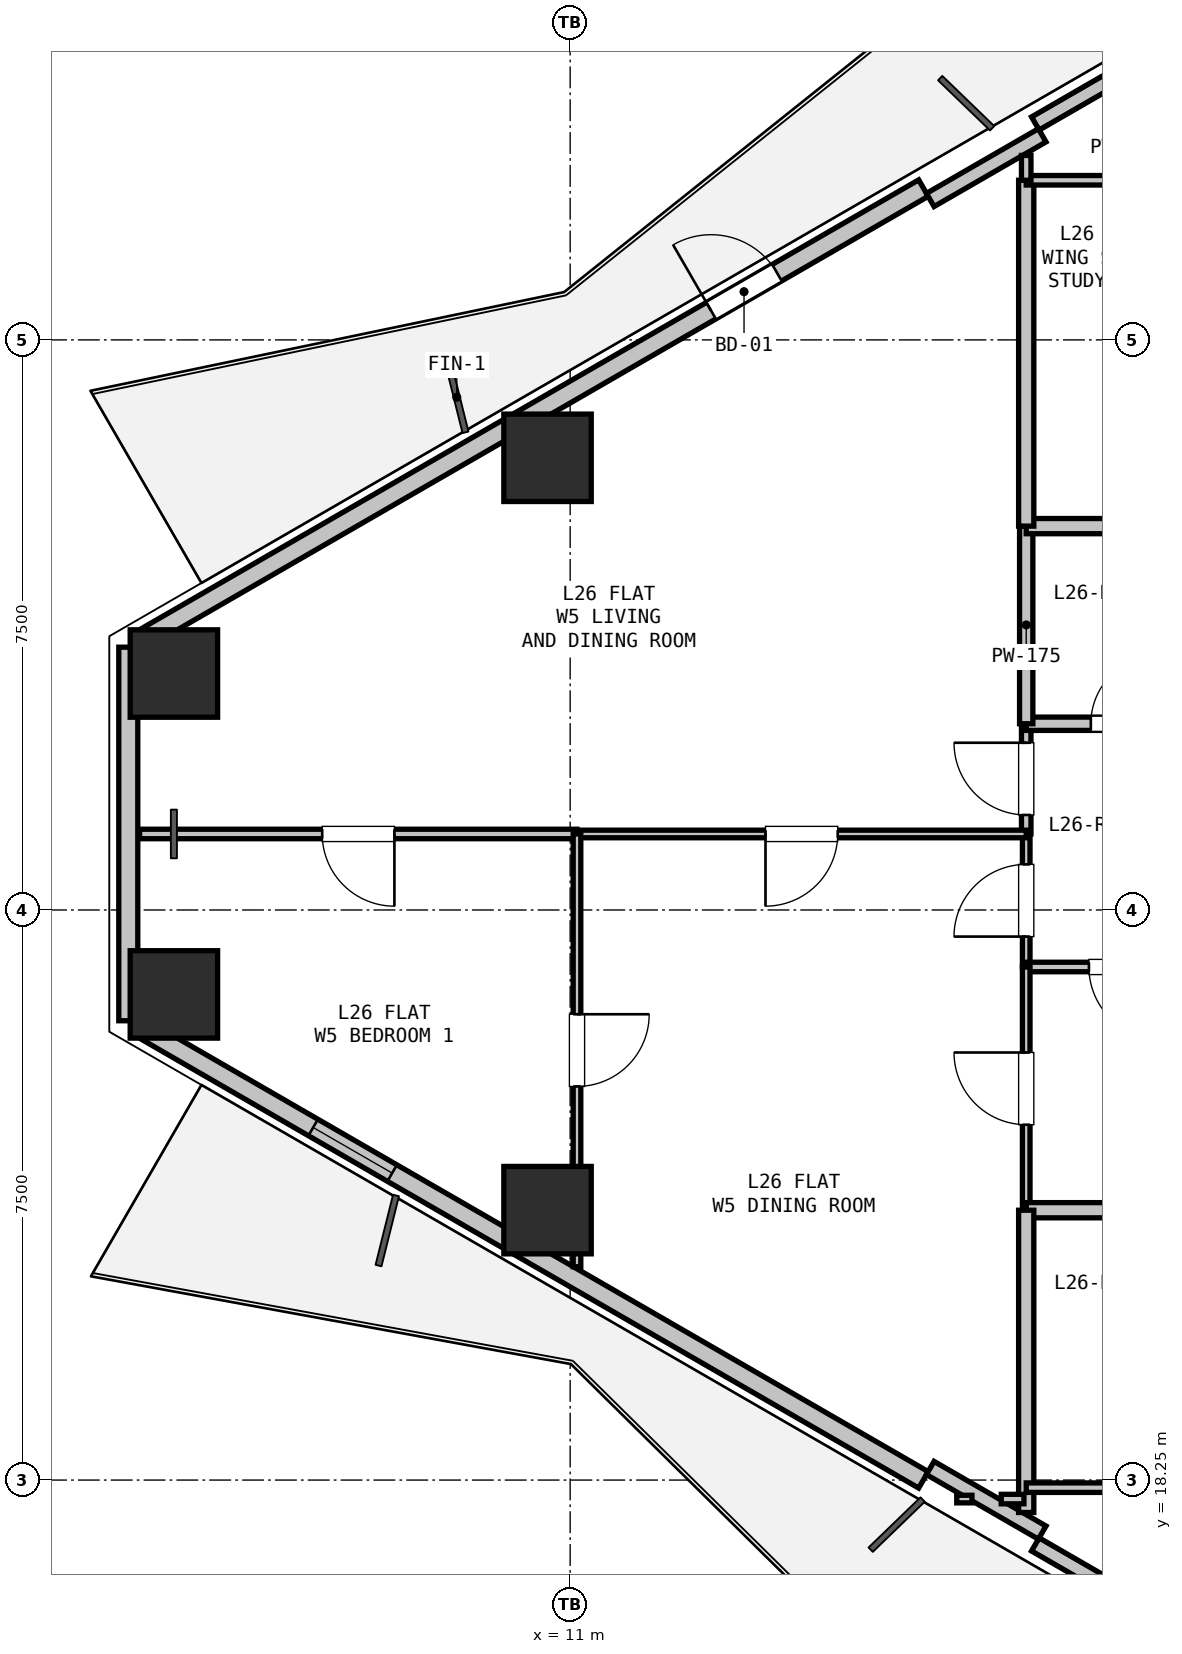
"""IFC4 building model, lengths in metres.
Left out: names, types, materials, properties, quantities, classifications, styles, units other than length and angle.
Written with IfcOpenShell. Run it as: python <this file> out.ifc"""

import sys

from ifc_helpers import new_model, si_unit, direction, frame, frame_2d, origin, origin_2d, place, context, subcontext, project, spatial, rectangle, hollow_rectangle, extrude, element, fill, save


model = new_model("IFC4")
c1 = context("Model", 3, precision=1e-05, world=origin(), true_north=direction((0.0, 1.0)))
c2 = subcontext(c1, "Body", "Model", "MODEL_VIEW")
j1 = project(units=[si_unit("LENGTHUNIT", "METRE"), si_unit("PLANEANGLEUNIT", "RADIAN")], contexts=[c1])
p1 = place(None, origin())
s1 = spatial("IfcSite", under=j1, at=p1, CompositionType="ELEMENT")
p2 = place(p1, origin())
s2 = spatial("IfcBuilding", under=s1, at=p2, CompositionType="ELEMENT")
p3 = place(p2, frame((0.0, 0.0, 96.6)))
s3 = spatial("IfcBuildingStorey", under=s2, at=p3, CompositionType="ELEMENT", Elevation=96.6)
for number, where, z_axis, x_axis in (
    (1, (5.787, 28.861, 0.0), (0.0, 0.0, 1.0), (1.0, 0.0, 0.0)),
    (2, (10.702, 31.699, 0.0), (0.0, 0.0, 1.0), (1.0, 0.0, 0.0)),
    (3, (10.702, 21.801, 0.0), (0.0, 0.0, 1.0), (1.0, 0.0, 0.0)),
    (4, (5.787, 24.639, 0.0), (0.0, 0.0, 1.0), (1.0, 0.0, 0.0)),
):
    element("IfcColumn", number, at=place(p3, frame(where, z_axis=z_axis, x_axis=x_axis)), inside=s3, PredefinedType="COLUMN", context=c2, shape_type="SweptSolid", body=[
        extrude(hollow_rectangle(XDim=1.15, YDim=1.15, WallThickness=0.032, at=origin_2d()), origin(), (0.0, 0.0, 1.0), 3.3),
    ])
p4 = place(p3, frame((5.187, 24.293, 0.0), z_axis=(0.0, 0.0, 1.0), x_axis=(0.0, 1.0, 0.0)))
e5 = element("IfcWall", 5, at=p4, inside=s3, PredefinedType="SOLIDWALL", context=c2, shape_type="SweptSolid", body=[
    extrude(rectangle(XDim=4.915, YDim=0.25, at=frame_2d((2.457, 0.0))), origin(), (0.0, 0.0, 1.0), 2.67),
])
p5 = place(p3, frame((5.317, 29.282, 0.0), z_axis=(0.0, 0.0, 1.0), x_axis=(0.866023023012, 0.500004123596, 0.0)))
e6 = element("IfcWall", 6, at=p5, inside=s3, PredefinedType="SOLIDWALL", context=c2, shape_type="SweptSolid", body=[
    extrude(rectangle(XDim=11.93, YDim=0.25, at=frame_2d((5.965, 0.0))), origin(), (0.0, 0.0, 1.0), 2.67),
])
p6 = place(p5, frame((8.704, 0.0, 0.0)))
e7 = element("IfcOpeningElement", 7, at=p6, cuts=e6, PredefinedType="OPENING", context=c2, shape_type="SweptSolid", body=[
    extrude(rectangle(XDim=1.0, YDim=2.1, at=frame_2d((0.5, 1.05))), frame((0.0, 0.135, 0.0), z_axis=(0.0, -1.0, 0.0), x_axis=(1.0, 0.0, 0.0)), (0.0, 0.0, 1.0), 0.27),
])
p7 = place(p3, frame((17.12, 36.097, 0.0), z_axis=(0.0, 0.0, 1.0), x_axis=(0.866027010039, 0.499997217876, 0.0)))
e8 = element("IfcWall", 8, at=p7, inside=s3, PredefinedType="PARAPET", context=c2, shape_type="SweptSolid", body=[
    extrude(rectangle(XDim=11.229, YDim=0.2, at=frame_2d((5.615, 0.0))), origin(), (0.0, 0.0, 1.0), 0.2),
])
p8 = place(p3, frame((15.738, 35.091, 0.0), z_axis=(0.0, 0.0, 1.0), x_axis=(0.866025371046, 0.500000056704, 0.0)))
e9 = element("IfcWall", 9, at=p8, inside=s3, PredefinedType="PARAPET", context=c2, shape_type="SweptSolid", body=[
    extrude(rectangle(XDim=1.7, YDim=0.2, at=frame_2d((0.85, 0.0))), origin(), (0.0, 0.0, 1.0), 2.67),
])
p9 = place(p3, frame((26.845, 11.788, 0.0), z_axis=(0.0, 0.0, 1.0), x_axis=(-0.866027010039, 0.499997217876, 0.0)))
e10 = element("IfcWall", 10, at=p9, inside=s3, PredefinedType="PARAPET", context=c2, shape_type="SweptSolid", body=[
    extrude(rectangle(XDim=11.229, YDim=0.2, at=frame_2d((5.615, 0.0))), origin(), (0.0, 0.0, 1.0), 0.2),
])
p10 = place(p3, frame((15.648, 18.253, 0.0), z_axis=(0.0, 0.0, 1.0), x_axis=(-0.866023023012, 0.500004123596, 0.0)))
e11 = element("IfcWall", 11, at=p10, inside=s3, PredefinedType="SOLIDWALL", context=c2, shape_type="SweptSolid", body=[
    extrude(rectangle(XDim=11.93, YDim=0.25, at=frame_2d((5.965, 0.0))), origin(), (0.0, 0.0, 1.0), 2.67),
])
p11 = place(p10, frame((8.071, 0.0, 0.9)))
e12 = element("IfcOpeningElement", 12, at=p11, cuts=e11, PredefinedType="OPENING", context=c2, shape_type="SweptSolid", body=[
    extrude(rectangle(XDim=1.2, YDim=1.4, at=frame_2d((0.6, 0.7))), frame((0.0, 0.135, 0.0), z_axis=(0.0, -1.0, 0.0), x_axis=(1.0, 0.0, 0.0)), (0.0, 0.0, 1.0), 0.27),
])
p12 = place(p3, frame((17.21, 17.559, 0.0), z_axis=(0.0, 0.0, 1.0), x_axis=(-0.866025371046, 0.500000056704, 0.0)))
e13 = element("IfcWall", 13, at=p12, inside=s3, PredefinedType="PARAPET", context=c2, shape_type="SweptSolid", body=[
    extrude(rectangle(XDim=1.7, YDim=0.2, at=frame_2d((0.85, 0.0))), origin(), (0.0, 0.0, 1.0), 2.67),
])
p13 = place(p3, frame((17.0, 25.0, 0.0), z_axis=(0.0, 0.0, 1.0), x_axis=(0.0, 1.0, 0.0)))
e14 = element("IfcWall", 14, at=p13, inside=s3, PredefinedType="PARTITIONING", context=c2, shape_type="SweptSolid", body=[
    extrude(rectangle(XDim=1.75, YDim=0.1, at=frame_2d((0.875, 0.0))), origin(), (0.0, 0.0, 1.0), 3.05),
])
p14 = place(p13, frame((0.4, 0.0, 0.0)))
e15 = element("IfcOpeningElement", 15, at=p14, cuts=e14, PredefinedType="OPENING", context=c2, shape_type="SweptSolid", body=[
    extrude(rectangle(XDim=0.95, YDim=2.1, at=frame_2d((0.475, 1.05))), frame((0.0, 0.06, 0.0), z_axis=(0.0, -1.0, 0.0), x_axis=(1.0, 0.0, 0.0)), (0.0, 0.0, 1.0), 0.12),
])
p15 = place(p3, frame((17.0, 26.75, 0.0), z_axis=(0.0, 0.0, 1.0), x_axis=(0.0, 1.0, 0.0)))
e16 = element("IfcWall", 16, at=p15, inside=s3, PredefinedType="PARTITIONING", context=c2, shape_type="SweptSolid", body=[
    extrude(rectangle(XDim=1.45, YDim=0.125, at=frame_2d((0.725, 0.0))), origin(), (0.0, 0.0, 1.0), 3.05),
])
p16 = place(p15, frame((0.25, 0.0, 0.0)))
e17 = element("IfcOpeningElement", 17, at=p16, cuts=e16, PredefinedType="OPENING", context=c2, shape_type="SweptSolid", body=[
    extrude(rectangle(XDim=0.95, YDim=2.1, at=frame_2d((0.475, 1.05))), frame((0.0, 0.073, 0.0), z_axis=(0.0, -1.0, 0.0), x_axis=(1.0, 0.0, 0.0)), (0.0, 0.0, 1.0), 0.145),
])
p17 = place(p3, frame((17.0, 28.2, 0.0), z_axis=(0.0, 0.0, 1.0), x_axis=(1.0, 0.0, 0.0)))
e18 = element("IfcWall", 18, at=p17, inside=s3, PredefinedType="PLUMBINGWALL", context=c2, shape_type="SweptSolid", body=[
    extrude(rectangle(XDim=2.6, YDim=0.175, at=frame_2d((1.3, 0.0))), origin(), (0.0, 0.0, 1.0), 3.05),
])
p18 = place(p17, frame((0.85, 0.0, 0.0)))
e19 = element("IfcOpeningElement", 19, at=p18, cuts=e18, PredefinedType="OPENING", context=c2, shape_type="SweptSolid", body=[
    extrude(rectangle(XDim=0.9, YDim=2.1, at=frame_2d((0.45, 1.05))), frame((0.0, 0.097, 0.0), z_axis=(0.0, -1.0, 0.0), x_axis=(1.0, 0.0, 0.0)), (0.0, 0.0, 1.0), 0.195),
])
p19 = place(p3, frame((19.6, 25.0, 0.0), z_axis=(0.0, 0.0, 1.0), x_axis=(-1.0, 0.0, 0.0)))
e20 = element("IfcWall", 20, at=p19, inside=s3, PredefinedType="PARTITIONING", context=c2, shape_type="SweptSolid", body=[
    extrude(rectangle(XDim=2.6, YDim=0.125, at=frame_2d((1.3, 0.0))), origin(), (0.0, 0.0, 1.0), 3.05),
])
p20 = place(p19, frame((0.825, 0.0, 0.0)))
e21 = element("IfcOpeningElement", 21, at=p20, cuts=e20, PredefinedType="OPENING", context=c2, shape_type="SweptSolid", body=[
    extrude(rectangle(XDim=0.95, YDim=2.1, at=frame_2d((0.475, 1.05))), frame((0.0, 0.073, 0.0), z_axis=(0.0, -1.0, 0.0), x_axis=(1.0, 0.0, 0.0)), (0.0, 0.0, 1.0), 0.145),
])
p21 = place(p3, frame((17.0, 28.2, 0.0), z_axis=(0.0, 0.0, 1.0), x_axis=(0.0, 1.0, 0.0)))
e22 = element("IfcWall", 22, at=p21, inside=s3, PredefinedType="PLUMBINGWALL", context=c2, shape_type="SweptSolid", body=[
    extrude(rectangle(XDim=2.6, YDim=0.175, at=frame_2d((1.3, 0.0))), origin(), (0.0, 0.0, 1.0), 3.05),
])
p22 = place(p3, frame((17.0, 30.8, 0.0), z_axis=(0.0, 0.0, 1.0), x_axis=(1.0, 0.0, 0.0)))
e23 = element("IfcWall", 23, at=p22, inside=s3, PredefinedType="PARTITIONING", context=c2, shape_type="SweptSolid", body=[
    extrude(rectangle(XDim=2.6, YDim=0.2, at=frame_2d((1.3, 0.0))), origin(), (0.0, 0.0, 1.0), 3.05),
])
p23 = place(p3, frame((17.0, 21.8, 0.0), z_axis=(0.0, 0.0, 1.0), x_axis=(0.0, 1.0, 0.0)))
e24 = element("IfcWall", 24, at=p23, inside=s3, PredefinedType="PARTITIONING", context=c2, shape_type="SweptSolid", body=[
    extrude(rectangle(XDim=3.2, YDim=0.1, at=frame_2d((1.6, 0.0))), origin(), (0.0, 0.0, 1.0), 2.423),
])
p24 = place(p23, frame((1.125, 0.0, 0.0)))
e25 = element("IfcOpeningElement", 25, at=p24, cuts=e24, PredefinedType="OPENING", context=c2, shape_type="SweptSolid", body=[
    extrude(rectangle(XDim=0.95, YDim=2.1, at=frame_2d((0.475, 1.05))), frame((0.0, 0.06, 0.0), z_axis=(0.0, -1.0, 0.0), x_axis=(1.0, 0.0, 0.0)), (0.0, 0.0, 1.0), 0.12),
])
p25 = place(p3, frame((19.6, 21.8, 0.0), z_axis=(0.0, 0.0, 1.0), x_axis=(-1.0, 0.0, 0.0)))
e26 = element("IfcWall", 26, at=p25, inside=s3, PredefinedType="PARTITIONING", context=c2, shape_type="SweptSolid", body=[
    extrude(rectangle(XDim=2.6, YDim=0.2, at=frame_2d((1.3, 0.0))), origin(), (0.0, 0.0, 1.0), 2.423),
])
p26 = place(p3, frame((17.0, 30.8, 0.0), z_axis=(0.0, 0.0, 1.0), x_axis=(0.0, 1.0, 0.0)))
e27 = element("IfcWall", 27, at=p26, inside=s3, PredefinedType="PARTITIONING", context=c2, shape_type="SweptSolid", body=[
    extrude(rectangle(XDim=4.55, YDim=0.2, at=frame_2d((2.275, 0.0))), origin(), (0.0, 0.0, 1.0), 2.365),
])
p27 = place(p3, frame((17.0, 35.35, 0.0), z_axis=(0.0, 0.0, 1.0), x_axis=(1.0, 0.0, 0.0)))
e28 = element("IfcWall", 28, at=p27, inside=s3, PredefinedType="PARTITIONING", context=c2, shape_type="SweptSolid", body=[
    extrude(rectangle(XDim=2.6, YDim=0.125, at=frame_2d((1.3, 0.0))), origin(), (0.0, 0.0, 1.0), 2.365),
])
p28 = place(p3, frame((17.0, 17.823, 0.0), z_axis=(0.0, 0.0, 1.0), x_axis=(0.0, 1.0, 0.0)))
e29 = element("IfcWall", 29, at=p28, inside=s3, PredefinedType="PARTITIONING", context=c2, shape_type="SweptSolid", body=[
    extrude(rectangle(XDim=3.977, YDim=0.2, at=frame_2d((1.988, 0.0))), origin(), (0.0, 0.0, 1.0), 2.365),
])
p29 = place(p3, frame((19.6, 18.15, 0.0), z_axis=(0.0, 0.0, 1.0), x_axis=(-1.0, 0.0, 0.0)))
e30 = element("IfcWall", 30, at=p29, inside=s3, PredefinedType="PARTITIONING", context=c2, shape_type="SweptSolid", body=[
    extrude(rectangle(XDim=2.6, YDim=0.125, at=frame_2d((1.3, 0.0))), origin(), (0.0, 0.0, 1.0), 2.365),
])
p30 = place(p3, frame((17.0, 35.677, 0.0), z_axis=(0.0, 0.0, 1.0), x_axis=(0.0, -1.0, 0.0)))
e31 = element("IfcWall", 31, at=p30, inside=s3, PredefinedType="PARTITIONING", context=c2, shape_type="SweptSolid", body=[
    extrude(rectangle(XDim=0.326, YDim=0.125, at=frame_2d((0.163, 0.0))), origin(), (0.0, 0.0, 1.0), 2.365),
])
p31 = place(p3, frame((17.0, 26.75, 0.0), z_axis=(0.0, 0.0, 1.0), x_axis=(-1.0, 0.0, 0.0)))
e32 = element("IfcWall", 32, at=p31, inside=s3, PredefinedType="PARTITIONING", context=c2, shape_type="SweptSolid", body=[
    extrude(rectangle(XDim=5.91, YDim=0.1, at=frame_2d((2.955, 0.0))), origin(), (0.0, 0.0, 1.0), 3.05),
])
p32 = place(p31, frame((2.48, 0.0, 0.0)))
e33 = element("IfcOpeningElement", 33, at=p32, cuts=e32, PredefinedType="OPENING", context=c2, shape_type="SweptSolid", body=[
    extrude(rectangle(XDim=0.95, YDim=2.1, at=frame_2d((0.475, 1.05))), frame((0.0, 0.06, 0.0), z_axis=(0.0, -1.0, 0.0), x_axis=(1.0, 0.0, 0.0)), (0.0, 0.0, 1.0), 0.12),
])
p33 = place(p3, frame((11.09, 26.75, 0.0), z_axis=(0.0, 0.0, 1.0), x_axis=(-1.0, 0.0, 0.0)))
e34 = element("IfcWall", 34, at=p33, inside=s3, PredefinedType="PARTITIONING", context=c2, shape_type="SweptSolid", body=[
    extrude(rectangle(XDim=5.754, YDim=0.125, at=frame_2d((2.877, 0.0))), origin(), (0.0, 0.0, 1.0), 2.714),
])
p34 = place(p33, frame((2.402, 0.0, 0.0)))
e35 = element("IfcOpeningElement", 35, at=p34, cuts=e34, PredefinedType="OPENING", context=c2, shape_type="SweptSolid", body=[
    extrude(rectangle(XDim=0.95, YDim=2.1, at=frame_2d((0.475, 1.05))), frame((0.0, 0.073, 0.0), z_axis=(0.0, -1.0, 0.0), x_axis=(1.0, 0.0, 0.0)), (0.0, 0.0, 1.0), 0.145),
])
p35 = place(p3, frame((11.09, 26.75, 0.0), z_axis=(0.0, 0.0, 1.0), x_axis=(0.0, -1.0, 0.0)))
e36 = element("IfcWall", 36, at=p35, inside=s3, PredefinedType="PARTITIONING", context=c2, shape_type="SweptSolid", body=[
    extrude(rectangle(XDim=5.693, YDim=0.1, at=frame_2d((2.847, 0.0))), origin(), (0.0, 0.0, 1.0), 2.423),
])
p36 = place(p35, frame((2.372, 0.0, 0.0)))
e37 = element("IfcOpeningElement", 37, at=p36, cuts=e36, PredefinedType="OPENING", context=c2, shape_type="SweptSolid", body=[
    extrude(rectangle(XDim=0.95, YDim=2.1, at=frame_2d((0.475, 1.05))), frame((0.0, 0.06, 0.0), z_axis=(0.0, -1.0, 0.0), x_axis=(1.0, 0.0, 0.0)), (0.0, 0.0, 1.0), 0.12),
])
p37 = place(p3, frame((16.97, 18.0, 0.0), z_axis=(0.0, 0.0, 1.0), x_axis=(-1.0, 0.0, 0.0)))
e38 = element("IfcWall", 38, at=p37, inside=s3, PredefinedType="PARTITIONING", context=c2, shape_type="SweptSolid", body=[
    extrude(rectangle(XDim=0.298, YDim=0.125, at=frame_2d((0.149, 0.0))), origin(), (0.0, 0.0, 1.0), 2.714),
])
p38 = place(p3, frame((16.286, 18.0, 0.0), z_axis=(0.0, 0.0, 1.0), x_axis=(-1.0, 0.0, 0.0)))
e39 = element("IfcWall", 39, at=p38, inside=s3, PredefinedType="PARTITIONING", context=c2, shape_type="SweptSolid", body=[
    extrude(rectangle(XDim=0.2, YDim=0.1, at=frame_2d((0.1, 0.0))), origin(), (0.0, 0.0, 1.0), 3.05),
])
p39 = place(p6, origin())
e40 = element("IfcDoor", 40, at=p39, inside=s3, OperationType="SINGLE_SWING_LEFT", PredefinedType="DOOR", context=c2, shape_type="SweptSolid", body=[
    extrude(rectangle(XDim=1.0, YDim=2.1, at=frame_2d((0.5, 1.05))), frame((0.0, 0.025, 0.0), z_axis=(0.0, -1.0, 0.0), x_axis=(1.0, 0.0, 0.0)), (0.0, 0.0, 1.0), 0.05),
])
fill(e7, e40)
p40 = place(p11, origin())
e41 = element("IfcWindow", 41, at=p40, inside=s3, PartitioningType="SINGLE_PANEL", PredefinedType="WINDOW", context=c2, shape_type="SweptSolid", body=[
    extrude(rectangle(XDim=1.2, YDim=1.4, at=frame_2d((0.6, 0.7))), frame((0.0, 0.03, 0.0), z_axis=(0.0, -1.0, 0.0), x_axis=(1.0, 0.0, 0.0)), (0.0, 0.0, 1.0), 0.06),
])
fill(e12, e41)
p41 = place(p18, origin())
e42 = element("IfcDoor", 42, at=p41, inside=s3, OperationType="SINGLE_SWING_RIGHT", PredefinedType="DOOR", context=c2, shape_type="SweptSolid", body=[
    extrude(rectangle(XDim=0.9, YDim=2.1, at=frame_2d((0.45, 1.05))), frame((0.0, 0.025, 0.0), z_axis=(0.0, -1.0, 0.0), x_axis=(1.0, 0.0, 0.0)), (0.0, 0.0, 1.0), 0.05),
])
fill(e19, e42)
p42 = place(p20, origin())
e43 = element("IfcDoor", 43, at=p42, inside=s3, OperationType="SINGLE_SWING_LEFT", PredefinedType="DOOR", context=c2, shape_type="SweptSolid", body=[
    extrude(rectangle(XDim=0.95, YDim=2.1, at=frame_2d((0.475, 1.05))), frame((0.0, 0.025, 0.0), z_axis=(0.0, -1.0, 0.0), x_axis=(1.0, 0.0, 0.0)), (0.0, 0.0, 1.0), 0.05),
])
fill(e21, e43)
p43 = place(p16, origin())
e44 = element("IfcDoor", 44, at=p43, inside=s3, OperationType="SINGLE_SWING_RIGHT", PredefinedType="DOOR", context=c2, shape_type="SweptSolid", body=[
    extrude(rectangle(XDim=0.95, YDim=2.1, at=frame_2d((0.475, 1.05))), frame((0.0, 0.025, 0.0), z_axis=(0.0, -1.0, 0.0), x_axis=(1.0, 0.0, 0.0)), (0.0, 0.0, 1.0), 0.05),
])
fill(e17, e44)
p44 = place(p14, origin())
e45 = element("IfcDoor", 45, at=p44, inside=s3, OperationType="SINGLE_SWING_LEFT", PredefinedType="DOOR", context=c2, shape_type="SweptSolid", body=[
    extrude(rectangle(XDim=0.95, YDim=2.1, at=frame_2d((0.475, 1.05))), frame((0.0, 0.025, 0.0), z_axis=(0.0, -1.0, 0.0), x_axis=(1.0, 0.0, 0.0)), (0.0, 0.0, 1.0), 0.05),
])
fill(e15, e45)
p45 = place(p24, origin())
e46 = element("IfcDoor", 46, at=p45, inside=s3, OperationType="SINGLE_SWING_RIGHT", PredefinedType="DOOR", context=c2, shape_type="SweptSolid", body=[
    extrude(rectangle(XDim=0.95, YDim=2.1, at=frame_2d((0.475, 1.05))), frame((0.0, 0.025, 0.0), z_axis=(0.0, -1.0, 0.0), x_axis=(1.0, 0.0, 0.0)), (0.0, 0.0, 1.0), 0.05),
])
fill(e25, e46)
p46 = place(p34, origin())
e47 = element("IfcDoor", 47, at=p46, inside=s3, OperationType="SINGLE_SWING_LEFT", PredefinedType="DOOR", context=c2, shape_type="SweptSolid", body=[
    extrude(rectangle(XDim=0.95, YDim=2.1, at=frame_2d((0.475, 1.05))), frame((0.0, 0.025, 0.0), z_axis=(0.0, -1.0, 0.0), x_axis=(1.0, 0.0, 0.0)), (0.0, 0.0, 1.0), 0.05),
])
fill(e35, e47)
p47 = place(p32, origin())
e48 = element("IfcDoor", 48, at=p47, inside=s3, OperationType="SINGLE_SWING_RIGHT", PredefinedType="DOOR", context=c2, shape_type="SweptSolid", body=[
    extrude(rectangle(XDim=0.95, YDim=2.1, at=frame_2d((0.475, 1.05))), frame((0.0, 0.025, 0.0), z_axis=(0.0, -1.0, 0.0), x_axis=(1.0, 0.0, 0.0)), (0.0, 0.0, 1.0), 0.05),
])
fill(e33, e48)
p48 = place(p36, origin())
e49 = element("IfcDoor", 49, at=p48, inside=s3, OperationType="SINGLE_SWING_LEFT", PredefinedType="DOOR", context=c2, shape_type="SweptSolid", body=[
    extrude(rectangle(XDim=0.95, YDim=2.1, at=frame_2d((0.475, 1.05))), frame((0.0, 0.025, 0.0), z_axis=(0.0, -1.0, 0.0), x_axis=(1.0, 0.0, 0.0)), (0.0, 0.0, 1.0), 0.05),
])
fill(e37, e49)
save(model, sys.argv[1])
